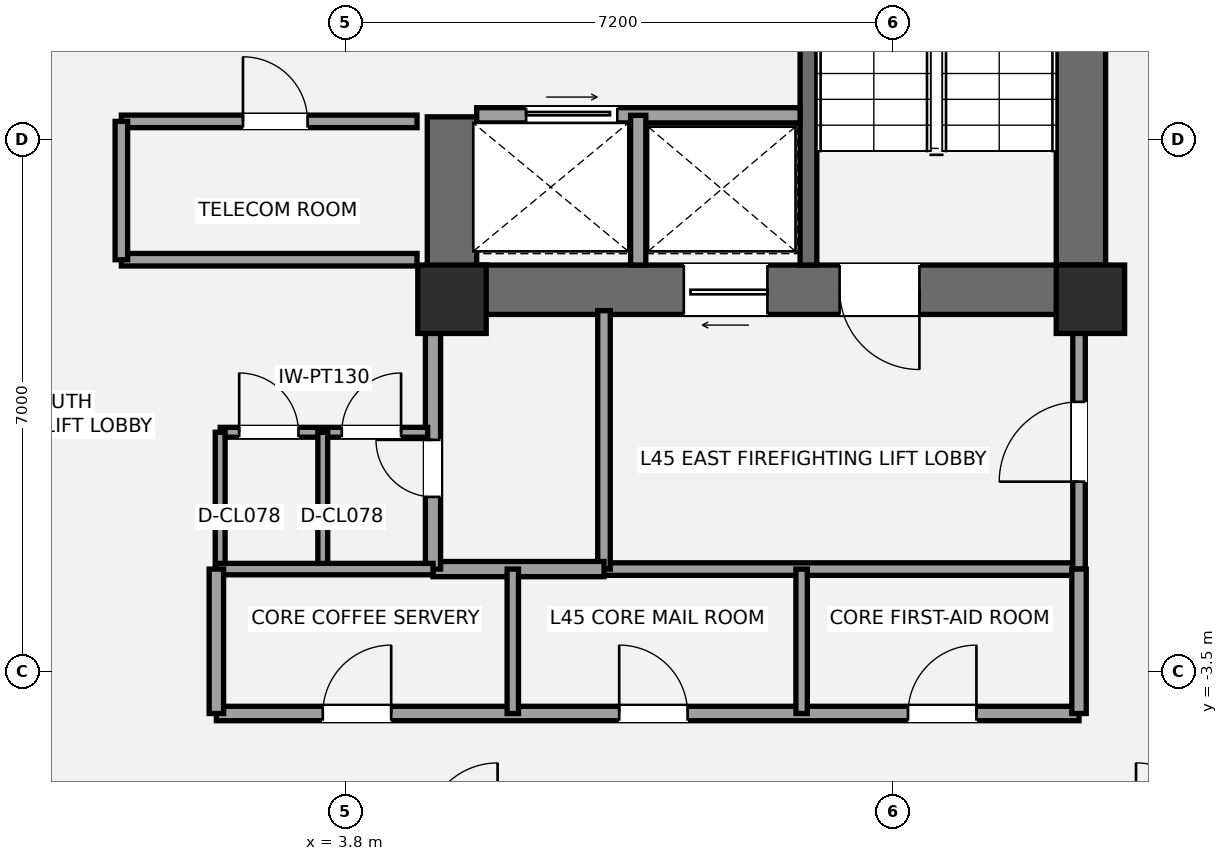
"""IFC4 building model, lengths in metres.
Left out: names, types, materials, properties, quantities, classifications, styles, units other than length and angle.
Written with IfcOpenShell. Run it as: python <this file> out.ifc"""

import sys

from ifc_helpers import new_model, si_unit, direction, frame, frame_2d, origin, origin_2d, place, context, subcontext, project, spatial, rectangle, extrude, element, fill, save


model = new_model("IFC4")
c1 = context("Model", 3, precision=1e-05, world=origin(), true_north=direction((0.0, 1.0)))
c2 = subcontext(c1, "Body", "Model", "MODEL_VIEW")
j1 = project(units=[si_unit("LENGTHUNIT", "METRE"), si_unit("PLANEANGLEUNIT", "RADIAN")], contexts=[c1])
p1 = place(None, origin())
s1 = spatial("IfcSite", under=j1, at=p1, CompositionType="ELEMENT")
p2 = place(p1, origin())
s2 = spatial("IfcBuilding", under=s1, at=p2, CompositionType="ELEMENT")
p3 = place(p2, frame((0.0, 0.0, 166.2)))
s3 = spatial("IfcBuildingStorey", under=s2, at=p3, CompositionType="ELEMENT", Elevation=166.2)
p4 = place(p3, frame((13.475, 1.2, 0.0), z_axis=(0.0, 0.0, 1.0), x_axis=(0.0, 1.0, 0.0)))
e1 = element("IfcWall", 1, at=p4, inside=s3, PredefinedType="SHEAR", context=c2, shape_type="SweptSolid", body=[
    extrude(rectangle(XDim=8.45, YDim=0.65, at=frame_2d((4.225, 0.0))), origin(), (0.0, 0.0, 1.0), 3.2),
])
p5 = place(p3, frame((13.8, 1.525, 0.0), z_axis=(0.0, 0.0, 1.0), x_axis=(-1.0, 0.0, 0.0)))
e2 = element("IfcWall", 2, at=p5, inside=s3, PredefinedType="SHEAR", context=c2, shape_type="SweptSolid", body=[
    extrude(rectangle(XDim=8.925, YDim=0.65, at=frame_2d((4.462, 0.0))), origin(), (0.0, 0.0, 1.0), 3.2),
])
p6 = place(p5, frame((2.45, 0.0, 0.0)))
e3 = element("IfcOpeningElement", 3, at=p6, cuts=e2, PredefinedType="OPENING", context=c2, shape_type="SweptSolid", body=[
    extrude(rectangle(XDim=1.05, YDim=2.15, at=frame_2d((0.525, 1.075))), frame((0.0, 0.335, 0.0), z_axis=(0.0, -1.0, 0.0), x_axis=(1.0, 0.0, 0.0)), (0.0, 0.0, 1.0), 0.67),
])
p7 = place(p5, frame((4.45, 0.0, 0.0)))
e4 = element("IfcOpeningElement", 4, at=p7, cuts=e2, PredefinedType="OPENING", context=c2, shape_type="SweptSolid", body=[
    extrude(rectangle(XDim=1.1, YDim=2.2, at=frame_2d((0.55, 1.1))), frame((0.0, 0.335, 0.0), z_axis=(0.0, -1.0, 0.0), x_axis=(1.0, 0.0, 0.0)), (0.0, 0.0, 1.0), 0.67),
])
p8 = place(p3, frame((5.2, 1.2, 0.0), z_axis=(0.0, 0.0, 1.0), x_axis=(0.0, 1.0, 0.0)))
e5 = element("IfcWall", 5, at=p8, inside=s3, PredefinedType="SHEAR", context=c2, shape_type="SweptSolid", body=[
    extrude(rectangle(XDim=2.6, YDim=0.65, at=frame_2d((1.3, 0.0))), origin(), (0.0, 0.0, 1.0), 3.2),
])
p9 = place(p3, frame((9.89, 1.85, 0.0), z_axis=(0.0, 0.0, 1.0), x_axis=(0.0, 1.0, 0.0)))
e6 = element("IfcWall", 6, at=p9, inside=s3, PredefinedType="SHEAR", context=c2, shape_type="SweptSolid", body=[
    extrude(rectangle(XDim=7.15, YDim=0.22, at=frame_2d((3.575, 0.0))), origin(), (0.0, 0.0, 1.0), 3.2),
])
for number, where, z_axis, x_axis in (
    (7, (5.2, 1.4, 0.0), (0.0, 0.0, 1.0), (1.0, 0.0, 0.0)),
    (8, (13.6, 1.4, 0.0), (0.0, 0.0, 1.0), (1.0, 0.0, 0.0)),
):
    element("IfcColumn", number, at=place(p3, frame(where, z_axis=z_axis, x_axis=x_axis)), inside=s3, PredefinedType="COLUMN", context=c2, shape_type="SweptSolid", body=[
        extrude(rectangle(XDim=0.9, YDim=0.9, at=origin_2d()), origin(), (0.0, 0.0, 1.0), 3.2),
    ])
p10 = place(p3, frame((7.2, -2.15, 0.0), z_axis=(0.0, 0.0, 1.0), x_axis=(1.0, 0.0, 0.0)))
e9 = element("IfcWall", 9, at=p10, inside=s3, PredefinedType="PARTITIONING", context=c2, shape_type="SweptSolid", body=[
    extrude(rectangle(XDim=6.25, YDim=0.165, at=frame_2d((3.125, 0.0))), origin(), (0.0, 0.0, 1.0), 3.02),
])
p11 = place(p3, frame((7.2, -2.15, 0.0), z_axis=(0.0, 0.0, 1.0), x_axis=(0.0, 1.0, 0.0)))
e10 = element("IfcWall", 10, at=p11, inside=s3, PredefinedType="PARTITIONING", context=c2, shape_type="SweptSolid", body=[
    extrude(rectangle(XDim=3.4, YDim=0.165, at=frame_2d((1.7, 0.0))), origin(), (0.0, 0.0, 1.0), 2.473),
])
p12 = place(p3, frame((13.45, -2.15, 0.0), z_axis=(0.0, 0.0, 1.0), x_axis=(0.0, 1.0, 0.0)))
e11 = element("IfcWall", 11, at=p12, inside=s3, PredefinedType="PARTITIONING", context=c2, shape_type="SweptSolid", body=[
    extrude(rectangle(XDim=3.4, YDim=0.165, at=frame_2d((1.7, 0.0))), origin(), (0.0, 0.0, 1.0), 3.02),
])
p13 = place(p12, frame((1.15, 0.0, 0.0)))
e12 = element("IfcOpeningElement", 12, at=p13, cuts=e11, PredefinedType="OPENING", context=c2, shape_type="SweptSolid", body=[
    extrude(rectangle(XDim=1.05, YDim=2.15, at=frame_2d((0.525, 1.075))), frame((0.0, 0.093, 0.0), z_axis=(0.0, -1.0, 0.0), x_axis=(1.0, 0.0, 0.0)), (0.0, 0.0, 1.0), 0.185),
])
p14 = place(p3, frame((4.95, -2.15, 0.0), z_axis=(0.0, 0.0, 1.0), x_axis=(1.0, 0.0, 0.0)))
e13 = element("IfcWall", 13, at=p14, inside=s3, PredefinedType="SOLIDWALL", context=c2, shape_type="SweptSolid", body=[
    extrude(rectangle(XDim=2.25, YDim=0.2, at=frame_2d((1.125, 0.0))), origin(), (0.0, 0.0, 1.0), 3.02),
])
p15 = place(p3, frame((4.95, -2.15, 0.0), z_axis=(0.0, 0.0, 1.0), x_axis=(0.0, 1.0, 0.0)))
e14 = element("IfcWall", 14, at=p15, inside=s3, PredefinedType="SOLIDWALL", context=c2, shape_type="SweptSolid", body=[
    extrude(rectangle(XDim=3.4, YDim=0.2, at=frame_2d((1.7, 0.0))), origin(), (0.0, 0.0, 1.0), 2.473),
])
p16 = place(p15, frame((0.95, 0.0, 0.0)))
e15 = element("IfcOpeningElement", 15, at=p16, cuts=e14, PredefinedType="OPENING", context=c2, shape_type="SweptSolid", body=[
    extrude(rectangle(XDim=0.75, YDim=2.1, at=frame_2d((0.375, 1.05))), frame((0.0, 0.11, 0.0), z_axis=(0.0, -1.0, 0.0), x_axis=(1.0, 0.0, 0.0)), (0.0, 0.0, 1.0), 0.22),
])
p17 = place(p3, frame((2.15, -0.35, 0.0), z_axis=(0.0, 0.0, 1.0), x_axis=(1.0, 0.0, 0.0)))
e16 = element("IfcWall", 16, at=p17, inside=s3, PredefinedType="PARTITIONING", context=c2, shape_type="SweptSolid", body=[
    extrude(rectangle(XDim=2.73, YDim=0.13, at=frame_2d((1.365, 0.0))), origin(), (0.0, 0.0, 1.0), 3.02),
])
p18 = place(p17, frame((0.25, 0.0, 0.0)))
e17 = element("IfcOpeningElement", 17, at=p18, cuts=e16, PredefinedType="OPENING", context=c2, shape_type="SweptSolid", body=[
    extrude(rectangle(XDim=0.78, YDim=2.1, at=frame_2d((0.39, 1.05))), frame((0.0, 0.075, 0.0), z_axis=(0.0, -1.0, 0.0), x_axis=(1.0, 0.0, 0.0)), (0.0, 0.0, 1.0), 0.15),
])
p19 = place(p17, frame((1.6, 0.0, 0.0)))
e18 = element("IfcOpeningElement", 18, at=p19, cuts=e16, PredefinedType="OPENING", context=c2, shape_type="SweptSolid", body=[
    extrude(rectangle(XDim=0.78, YDim=2.1, at=frame_2d((0.39, 1.05))), frame((0.0, 0.075, 0.0), z_axis=(0.0, -1.0, 0.0), x_axis=(1.0, 0.0, 0.0)), (0.0, 0.0, 1.0), 0.15),
])
p20 = place(p3, frame((2.15, -2.15, 0.0), z_axis=(0.0, 0.0, 1.0), x_axis=(0.0, 1.0, 0.0)))
e19 = element("IfcWall", 19, at=p20, inside=s3, PredefinedType="PARTITIONING", context=c2, shape_type="SweptSolid", body=[
    extrude(rectangle(XDim=1.8, YDim=0.13, at=frame_2d((0.9, 0.0))), origin(), (0.0, 0.0, 1.0), 3.02),
])
p21 = place(p3, frame((3.5, -2.15, 0.0), z_axis=(0.0, 0.0, 1.0), x_axis=(0.0, 1.0, 0.0)))
e20 = element("IfcWall", 20, at=p21, inside=s3, PredefinedType="PARTITIONING", context=c2, shape_type="SweptSolid", body=[
    extrude(rectangle(XDim=1.8, YDim=0.13, at=frame_2d((0.9, 0.0))), origin(), (0.0, 0.0, 1.0), 2.473),
])
p22 = place(p3, frame((5.525, 3.82, 0.0), z_axis=(0.0, 0.0, 1.0), x_axis=(1.0, 0.0, 0.0)))
e21 = element("IfcWall", 21, at=p22, inside=s3, PredefinedType="SOLIDWALL", context=c2, shape_type="SweptSolid", body=[
    extrude(rectangle(XDim=4.255, YDim=0.2, at=frame_2d((2.127, 0.0))), origin(), (0.0, 0.0, 1.0), 3.02),
])
p23 = place(p22, frame((0.65, 0.0, 0.0)))
e22 = element("IfcOpeningElement", 22, at=p23, cuts=e21, PredefinedType="OPENING", context=c2, shape_type="SweptSolid", body=[
    extrude(rectangle(XDim=1.2, YDim=2.2, at=frame_2d((0.6, 1.1))), frame((0.0, 0.11, 0.0), z_axis=(0.0, -1.0, 0.0), x_axis=(1.0, 0.0, 0.0)), (0.0, 0.0, 1.0), 0.22),
])
p24 = place(p3, frame((7.65, 1.85, 0.0), z_axis=(0.0, 0.0, 1.0), x_axis=(0.0, 1.0, 0.0)))
e23 = element("IfcWall", 23, at=p24, inside=s3, PredefinedType="SOLIDWALL", context=c2, shape_type="SweptSolid", body=[
    extrude(rectangle(XDim=1.97, YDim=0.2, at=frame_2d((0.985, 0.0))), origin(), (0.0, 0.0, 1.0), 3.02),
])
p25 = place(p3, frame((0.85, 1.92, 0.0), z_axis=(0.0, 0.0, 1.0), x_axis=(1.0, 0.0, 0.0)))
e24 = element("IfcWall", 24, at=p25, inside=s3, PredefinedType="PARTITIONING", context=c2, shape_type="SweptSolid", body=[
    extrude(rectangle(XDim=3.89, YDim=0.165, at=frame_2d((1.945, 0.0))), origin(), (0.0, 0.0, 1.0), 2.16),
])
p26 = place(p3, frame((0.85, 3.74, 0.0), z_axis=(0.0, 0.0, 1.0), x_axis=(1.0, 0.0, 0.0)))
e25 = element("IfcWall", 25, at=p26, inside=s3, PredefinedType="PARTITIONING", context=c2, shape_type="SweptSolid", body=[
    extrude(rectangle(XDim=3.89, YDim=0.165, at=frame_2d((1.945, 0.0))), origin(), (0.0, 0.0, 1.0), 3.02),
])
p27 = place(p26, frame((1.6, 0.0, 0.0)))
e26 = element("IfcOpeningElement", 26, at=p27, cuts=e25, PredefinedType="OPENING", context=c2, shape_type="SweptSolid", body=[
    extrude(rectangle(XDim=0.85, YDim=2.1, at=frame_2d((0.425, 1.05))), frame((0.0, 0.093, 0.0), z_axis=(0.0, -1.0, 0.0), x_axis=(1.0, 0.0, 0.0)), (0.0, 0.0, 1.0), 0.185),
])
p28 = place(p3, frame((0.85, 1.92, 0.0), z_axis=(0.0, 0.0, 1.0), x_axis=(0.0, 1.0, 0.0)))
e27 = element("IfcWall", 27, at=p28, inside=s3, PredefinedType="PARTITIONING", context=c2, shape_type="SweptSolid", body=[
    extrude(rectangle(XDim=1.82, YDim=0.165, at=frame_2d((0.91, 0.0))), origin(), (0.0, 0.0, 1.0), 3.02),
])
p29 = place(p3, frame((2.1, -4.05, 0.0), z_axis=(0.0, 0.0, 1.0), x_axis=(1.0, 0.0, 0.0)))
e28 = element("IfcWall", 28, at=p29, inside=s3, PredefinedType="PLUMBINGWALL", context=c2, shape_type="SweptSolid", body=[
    extrude(rectangle(XDim=11.35, YDim=0.19, at=frame_2d((5.675, 0.0))), origin(), (0.0, 0.0, 1.0), 2.473),
])
p30 = place(p29, frame((1.4, 0.0, 0.0)))
e29 = element("IfcOpeningElement", 29, at=p30, cuts=e28, PredefinedType="OPENING", context=c2, shape_type="SweptSolid", body=[
    extrude(rectangle(XDim=0.9, YDim=2.1, at=frame_2d((0.45, 1.05))), frame((0.0, 0.105, 0.0), z_axis=(0.0, -1.0, 0.0), x_axis=(1.0, 0.0, 0.0)), (0.0, 0.0, 1.0), 0.21),
])
p31 = place(p29, frame((5.3, 0.0, 0.0)))
e30 = element("IfcOpeningElement", 30, at=p31, cuts=e28, PredefinedType="OPENING", context=c2, shape_type="SweptSolid", body=[
    extrude(rectangle(XDim=0.9, YDim=2.1, at=frame_2d((0.45, 1.05))), frame((0.0, 0.105, 0.0), z_axis=(0.0, -1.0, 0.0), x_axis=(1.0, 0.0, 0.0)), (0.0, 0.0, 1.0), 0.21),
])
p32 = place(p29, frame((9.1, 0.0, 0.0)))
e31 = element("IfcOpeningElement", 31, at=p32, cuts=e28, PredefinedType="OPENING", context=c2, shape_type="SweptSolid", body=[
    extrude(rectangle(XDim=0.9, YDim=2.1, at=frame_2d((0.45, 1.05))), frame((0.0, 0.105, 0.0), z_axis=(0.0, -1.0, 0.0), x_axis=(1.0, 0.0, 0.0)), (0.0, 0.0, 1.0), 0.21),
])
p33 = place(p3, frame((2.1, -2.15, 0.0), z_axis=(0.0, 0.0, 1.0), x_axis=(1.0, 0.0, 0.0)))
e32 = element("IfcWall", 32, at=p33, inside=s3, PredefinedType="PLUMBINGWALL", context=c2, shape_type="SweptSolid", body=[
    extrude(rectangle(XDim=2.85, YDim=0.15, at=frame_2d((1.425, 0.0))), origin(), (0.0, 0.0, 1.0), 3.02),
])
for number, where, z_axis, x_axis in (
    (33, (2.1, -4.05, 0.0), (0.0, 0.0, 1.0), (0.0, 1.0, 0.0)),
    (34, (13.45, -4.05, 0.0), (0.0, 0.0, 1.0), (0.0, 1.0, 0.0)),
):
    element("IfcWall", number, at=place(p3, frame(where, z_axis=z_axis, x_axis=x_axis)), inside=s3, PredefinedType="PLUMBINGWALL", context=c2, shape_type="SweptSolid", body=[
        extrude(rectangle(XDim=1.9, YDim=0.19, at=frame_2d((0.95, 0.0))), origin(), (0.0, 0.0, 1.0), 2.473),
    ])
p34 = place(p3, frame((6.0, -4.05, 0.0), z_axis=(0.0, 0.0, 1.0), x_axis=(0.0, 1.0, 0.0)))
e35 = element("IfcWall", 35, at=p34, inside=s3, PredefinedType="PLUMBINGWALL", context=c2, shape_type="SweptSolid", body=[
    extrude(rectangle(XDim=1.9, YDim=0.15, at=frame_2d((0.95, 0.0))), origin(), (0.0, 0.0, 1.0), 2.473),
])
p35 = place(p3, frame((9.8, -4.05, 0.0), z_axis=(0.0, 0.0, 1.0), x_axis=(0.0, 1.0, 0.0)))
e36 = element("IfcWall", 36, at=p35, inside=s3, PredefinedType="PLUMBINGWALL", context=c2, shape_type="SweptSolid", body=[
    extrude(rectangle(XDim=1.9, YDim=0.15, at=frame_2d((0.95, 0.0))), origin(), (0.0, 0.0, 1.0), 3.02),
])
p36 = place(p6, origin())
e37 = element("IfcDoor", 37, at=p36, inside=s3, OperationType="SINGLE_SWING_LEFT", PredefinedType="DOOR", context=c2, shape_type="SweptSolid", body=[
    extrude(rectangle(XDim=1.05, YDim=2.15, at=frame_2d((0.525, 1.075))), frame((0.0, 0.025, 0.0), z_axis=(0.0, -1.0, 0.0), x_axis=(1.0, 0.0, 0.0)), (0.0, 0.0, 1.0), 0.05),
])
fill(e3, e37)
p37 = place(p13, origin())
e38 = element("IfcDoor", 38, at=p37, inside=s3, OperationType="SINGLE_SWING_LEFT", PredefinedType="DOOR", context=c2, shape_type="SweptSolid", body=[
    extrude(rectangle(XDim=1.05, YDim=2.15, at=frame_2d((0.525, 1.075))), frame((0.0, 0.025, 0.0), z_axis=(0.0, -1.0, 0.0), x_axis=(1.0, 0.0, 0.0)), (0.0, 0.0, 1.0), 0.05),
])
fill(e12, e38)
p38 = place(p16, origin())
e39 = element("IfcDoor", 39, at=p38, inside=s3, OperationType="SINGLE_SWING_RIGHT", PredefinedType="DOOR", context=c2, shape_type="SweptSolid", body=[
    extrude(rectangle(XDim=0.75, YDim=2.1, at=frame_2d((0.375, 1.05))), frame((0.0, 0.025, 0.0), z_axis=(0.0, -1.0, 0.0), x_axis=(1.0, 0.0, 0.0)), (0.0, 0.0, 1.0), 0.05),
])
fill(e15, e39)
p39 = place(p18, origin())
e40 = element("IfcDoor", 40, at=p39, inside=s3, OperationType="SINGLE_SWING_LEFT", PredefinedType="DOOR", context=c2, shape_type="SweptSolid", body=[
    extrude(rectangle(XDim=0.78, YDim=2.1, at=frame_2d((0.39, 1.05))), frame((0.0, 0.025, 0.0), z_axis=(0.0, -1.0, 0.0), x_axis=(1.0, 0.0, 0.0)), (0.0, 0.0, 1.0), 0.05),
])
fill(e17, e40)
p40 = place(p19, origin())
e41 = element("IfcDoor", 41, at=p40, inside=s3, OperationType="SINGLE_SWING_RIGHT", PredefinedType="DOOR", context=c2, shape_type="SweptSolid", body=[
    extrude(rectangle(XDim=0.78, YDim=2.1, at=frame_2d((0.39, 1.05))), frame((0.0, 0.025, 0.0), z_axis=(0.0, -1.0, 0.0), x_axis=(1.0, 0.0, 0.0)), (0.0, 0.0, 1.0), 0.05),
])
fill(e18, e41)
p41 = place(p7, origin())
e42 = element("IfcDoor", 42, at=p41, inside=s3, OperationType="SLIDING_TO_LEFT", PredefinedType="DOOR", context=c2, shape_type="SweptSolid", body=[
    extrude(rectangle(XDim=1.1, YDim=2.2, at=frame_2d((0.55, 1.1))), frame((0.0, 0.025, 0.0), z_axis=(0.0, -1.0, 0.0), x_axis=(1.0, 0.0, 0.0)), (0.0, 0.0, 1.0), 0.05),
])
fill(e4, e42)
p42 = place(p23, origin())
e43 = element("IfcDoor", 43, at=p42, inside=s3, OperationType="SLIDING_TO_RIGHT", PredefinedType="DOOR", context=c2, shape_type="SweptSolid", body=[
    extrude(rectangle(XDim=1.2, YDim=2.2, at=frame_2d((0.6, 1.1))), frame((0.0, 0.025, 0.0), z_axis=(0.0, -1.0, 0.0), x_axis=(1.0, 0.0, 0.0)), (0.0, 0.0, 1.0), 0.05),
])
fill(e22, e43)
p43 = place(p27, origin())
e44 = element("IfcDoor", 44, at=p43, inside=s3, OperationType="SINGLE_SWING_LEFT", PredefinedType="DOOR", context=c2, shape_type="SweptSolid", body=[
    extrude(rectangle(XDim=0.85, YDim=2.1, at=frame_2d((0.425, 1.05))), frame((0.0, 0.025, 0.0), z_axis=(0.0, -1.0, 0.0), x_axis=(1.0, 0.0, 0.0)), (0.0, 0.0, 1.0), 0.05),
])
fill(e26, e44)
p44 = place(p30, origin())
e45 = element("IfcDoor", 45, at=p44, inside=s3, OperationType="SINGLE_SWING_RIGHT", PredefinedType="DOOR", context=c2, shape_type="SweptSolid", body=[
    extrude(rectangle(XDim=0.9, YDim=2.1, at=frame_2d((0.45, 1.05))), frame((0.0, 0.025, 0.0), z_axis=(0.0, -1.0, 0.0), x_axis=(1.0, 0.0, 0.0)), (0.0, 0.0, 1.0), 0.05),
])
fill(e29, e45)
p45 = place(p31, origin())
e46 = element("IfcDoor", 46, at=p45, inside=s3, OperationType="SINGLE_SWING_LEFT", PredefinedType="DOOR", context=c2, shape_type="SweptSolid", body=[
    extrude(rectangle(XDim=0.9, YDim=2.1, at=frame_2d((0.45, 1.05))), frame((0.0, 0.025, 0.0), z_axis=(0.0, -1.0, 0.0), x_axis=(1.0, 0.0, 0.0)), (0.0, 0.0, 1.0), 0.05),
])
fill(e30, e46)
p46 = place(p32, origin())
e47 = element("IfcDoor", 47, at=p46, inside=s3, OperationType="SINGLE_SWING_RIGHT", PredefinedType="DOOR", context=c2, shape_type="SweptSolid", body=[
    extrude(rectangle(XDim=0.9, YDim=2.1, at=frame_2d((0.45, 1.05))), frame((0.0, 0.025, 0.0), z_axis=(0.0, -1.0, 0.0), x_axis=(1.0, 0.0, 0.0)), (0.0, 0.0, 1.0), 0.05),
])
fill(e31, e47)
save(model, sys.argv[1])
